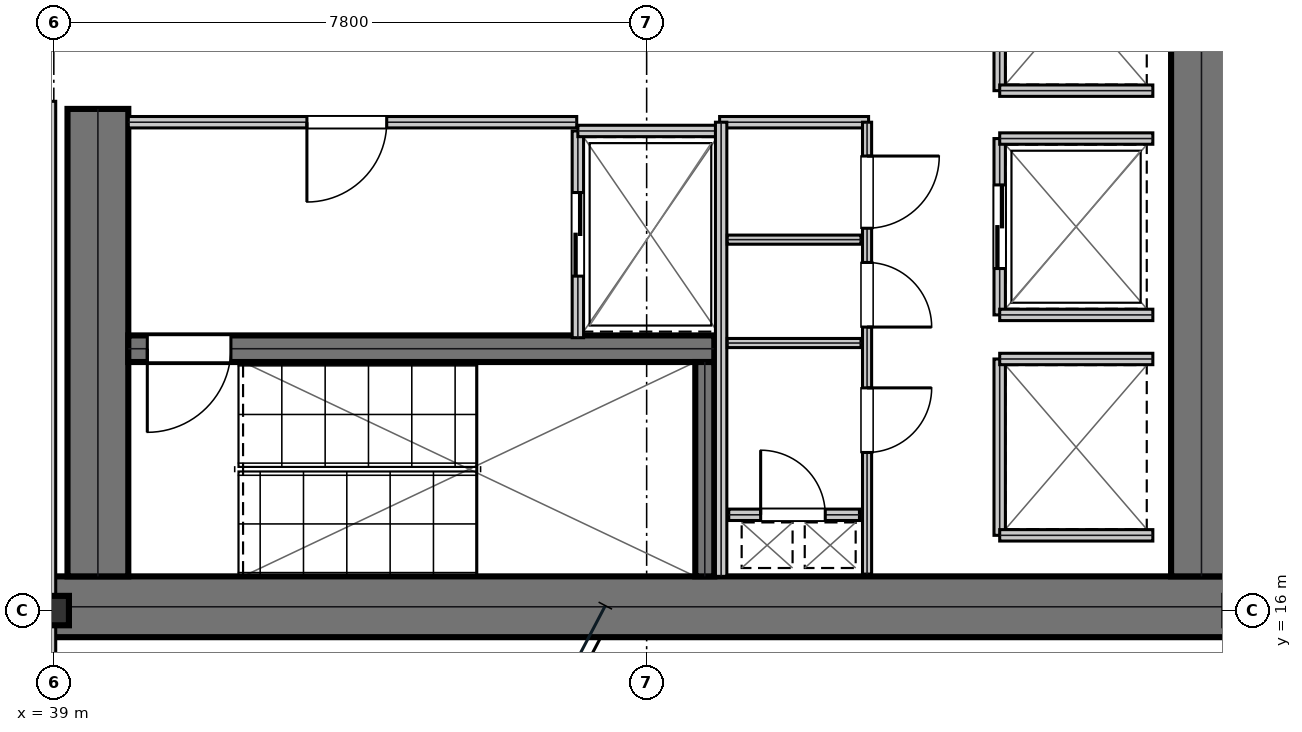
"""IFC4 building model, lengths in metres.
Left out: names, types, materials, properties, quantities, classifications, styles, units other than length and angle.
Written with IfcOpenShell. Run it as: python <this file> out.ifc"""

import sys

from ifc_helpers import new_model, si_unit, direction, frame, frame_2d, origin, origin_2d, place, context, subcontext, project, spatial, rectangle, i_section, extrude, element, fill, save


model = new_model("IFC4")
c1 = context("Model", 3, precision=1e-05, world=origin(), true_north=direction((0.0, 1.0)))
c2 = subcontext(c1, "Body", "Model", "MODEL_VIEW")
j1 = project(units=[si_unit("LENGTHUNIT", "METRE"), si_unit("PLANEANGLEUNIT", "RADIAN")], contexts=[c1])
p1 = place(None, origin())
s1 = spatial("IfcSite", under=j1, at=p1, CompositionType="ELEMENT")
p2 = place(p1, origin())
s2 = spatial("IfcBuilding", under=s1, at=p2, CompositionType="ELEMENT")
p3 = place(p2, frame((0.0, 0.0, 141.15)))
s3 = spatial("IfcBuildingStorey", under=s2, at=p3, CompositionType="ELEMENT", Elevation=141.15)
p4 = place(p3, frame((38.8, 16.05, 0.0), z_axis=(0.0, 0.0, 1.0), x_axis=(1.0, 0.0, 0.0)))
e1 = element("IfcWall", 1, at=p4, inside=s3, PredefinedType="SHEAR", context=c2, shape_type="SweptSolid", body=[
    extrude(rectangle(XDim=16.0, YDim=0.8, at=frame_2d((8.0, 0.0))), origin(), (0.0, 0.0, 1.0), 3.81),
])
p5 = place(p3, frame((39.58, 16.45, 0.0), z_axis=(0.0, 0.0, 1.0), x_axis=(0.0, 1.0, 0.0)))
e2 = element("IfcWall", 2, at=p5, inside=s3, PredefinedType="SHEAR", context=c2, shape_type="SweptSolid", body=[
    extrude(rectangle(XDim=6.15, YDim=0.8, at=frame_2d((3.075, 0.0))), origin(), (0.0, 0.0, 1.0), 3.81),
])
p6 = place(p3, frame((54.1, 16.45, 0.0), z_axis=(0.0, 0.0, 1.0), x_axis=(0.0, 1.0, 0.0)))
e3 = element("IfcWall", 3, at=p6, inside=s3, PredefinedType="SHEAR", context=c2, shape_type="SweptSolid", body=[
    extrude(rectangle(XDim=15.1, YDim=0.8, at=frame_2d((7.55, 0.0))), origin(), (0.0, 0.0, 1.0), 3.81),
])
p7 = place(p3, frame((39.98, 19.445, 0.0), z_axis=(0.0, 0.0, 1.0), x_axis=(1.0, 0.0, 0.0)))
e4 = element("IfcWall", 4, at=p7, inside=s3, PredefinedType="SHEAR", context=c2, shape_type="SweptSolid", body=[
    extrude(rectangle(XDim=7.71, YDim=0.35, at=frame_2d((3.855, 0.0))), origin(), (0.0, 0.0, 1.0), 3.81),
])
p8 = place(p7, frame((0.25, 0.0, 0.0)))
e5 = element("IfcOpeningElement", 5, at=p8, cuts=e4, PredefinedType="OPENING", context=c2, shape_type="SweptSolid", body=[
    extrude(rectangle(XDim=1.1, YDim=2.15, at=frame_2d((0.55, 1.075))), frame((0.0, 0.185, 0.0), z_axis=(0.0, -1.0, 0.0), x_axis=(1.0, 0.0, 0.0)), (0.0, 0.0, 1.0), 0.37),
])
p9 = place(p3, frame((47.565, 16.45, 0.0), z_axis=(0.0, 0.0, 1.0), x_axis=(0.0, 1.0, 0.0)))
e6 = element("IfcWall", 6, at=p9, inside=s3, PredefinedType="SHEAR", context=c2, shape_type="SweptSolid", body=[
    extrude(rectangle(XDim=2.82, YDim=0.25, at=frame_2d((1.41, 0.0))), origin(), (0.0, 0.0, 1.0), 3.81),
])
p10 = place(p3, frame((39.0, 16.0, 0.0), z_axis=(0.0, 0.0, 1.0), x_axis=(1.0, 0.0, 0.0)))
e7 = element("IfcColumn", 7, at=p10, inside=s3, PredefinedType="COLUMN", context=c2, shape_type="SweptSolid", body=[
    extrude(i_section(OverallWidth=0.398, OverallDepth=0.387, WebThickness=0.021, FlangeThickness=0.033, at=origin_2d()), origin(), (0.0, 0.0, 1.0), 4.044),
])
p11 = place(p3, frame((39.98, 22.425, 0.0), z_axis=(0.0, 0.0, 1.0), x_axis=(1.0, 0.0, 0.0)))
e8 = element("IfcWall", 8, at=p11, inside=s3, PredefinedType="PARTITIONING", context=c2, shape_type="SweptSolid", body=[
    extrude(rectangle(XDim=5.9, YDim=0.15, at=frame_2d((2.95, 0.0))), origin(), (0.0, 0.0, 1.0), 3.81),
])
p12 = place(p11, frame((2.35, 0.0, 0.0)))
e9 = element("IfcOpeningElement", 9, at=p12, cuts=e8, PredefinedType="OPENING", context=c2, shape_type="SweptSolid", body=[
    extrude(rectangle(XDim=1.05, YDim=2.15, at=frame_2d((0.525, 1.075))), frame((0.0, 0.085, 0.0), z_axis=(0.0, -1.0, 0.0), x_axis=(1.0, 0.0, 0.0)), (0.0, 0.0, 1.0), 0.17),
])
p13 = place(p3, frame((45.895, 19.59, 0.0), z_axis=(0.0, 0.0, 1.0), x_axis=(0.0, 1.0, 0.0)))
e10 = element("IfcWall", 10, at=p13, inside=s3, PredefinedType="PARTITIONING", context=c2, shape_type="SweptSolid", body=[
    extrude(rectangle(XDim=2.72, YDim=0.15, at=frame_2d((1.36, 0.0))), origin(), (0.0, 0.0, 1.0), 3.81),
])
p14 = place(p13, frame((0.81, 0.0, 0.0)))
e11 = element("IfcOpeningElement", 11, at=p14, cuts=e10, PredefinedType="OPENING", context=c2, shape_type="SweptSolid", body=[
    extrude(rectangle(XDim=1.1, YDim=2.15, at=frame_2d((0.55, 1.075))), frame((0.0, 0.085, 0.0), z_axis=(0.0, -1.0, 0.0), x_axis=(1.0, 0.0, 0.0)), (0.0, 0.0, 1.0), 0.17),
])
p15 = place(p3, frame((45.895, 22.31, 0.0), z_axis=(0.0, 0.0, 1.0), x_axis=(1.0, 0.0, 0.0)))
e12 = element("IfcWall", 12, at=p15, inside=s3, PredefinedType="PARTITIONING", context=c2, shape_type="SweptSolid", body=[
    extrude(rectangle(XDim=1.915, YDim=0.15, at=frame_2d((0.958, 0.0))), origin(), (0.0, 0.0, 1.0), 3.81),
])
p16 = place(p3, frame((51.445, 19.89, 0.0), z_axis=(0.0, 0.0, 1.0), x_axis=(0.0, 1.0, 0.0)))
e13 = element("IfcWall", 13, at=p16, inside=s3, PredefinedType="PARTITIONING", context=c2, shape_type="SweptSolid", body=[
    extrude(rectangle(XDim=2.32, YDim=0.15, at=frame_2d((1.16, 0.0))), origin(), (0.0, 0.0, 1.0), 3.81),
])
p17 = place(p16, frame((0.61, 0.0, 0.0)))
e14 = element("IfcOpeningElement", 14, at=p17, cuts=e13, PredefinedType="OPENING", context=c2, shape_type="SweptSolid", body=[
    extrude(rectangle(XDim=1.1, YDim=2.15, at=frame_2d((0.55, 1.075))), frame((0.0, 0.085, 0.0), z_axis=(0.0, -1.0, 0.0), x_axis=(1.0, 0.0, 0.0)), (0.0, 0.0, 1.0), 0.17),
])
for number, where, z_axis, x_axis in (
    (15, (51.445, 19.89, 0.0), (0.0, 0.0, 1.0), (1.0, 0.0, 0.0)),
    (16, (51.445, 22.21, 0.0), (0.0, 0.0, 1.0), (1.0, 0.0, 0.0)),
):
    element("IfcWall", number, at=place(p3, frame(where, z_axis=z_axis, x_axis=x_axis)), inside=s3, PredefinedType="PARTITIONING", context=c2, shape_type="SweptSolid", body=[
        extrude(rectangle(XDim=2.015, YDim=0.15, at=frame_2d((1.007, 0.0))), origin(), (0.0, 0.0, 1.0), 3.81),
    ])
p18 = place(p3, frame((51.445, 22.84, 0.0), z_axis=(0.0, 0.0, 1.0), x_axis=(0.0, 1.0, 0.0)))
e17 = element("IfcWall", 17, at=p18, inside=s3, PredefinedType="PARTITIONING", context=c2, shape_type="SweptSolid", body=[
    extrude(rectangle(XDim=2.32, YDim=0.15, at=frame_2d((1.16, 0.0))), origin(), (0.0, 0.0, 1.0), 3.81),
])
p19 = place(p3, frame((51.445, 22.84, 0.0), z_axis=(0.0, 0.0, 1.0), x_axis=(1.0, 0.0, 0.0)))
e18 = element("IfcWall", 18, at=p19, inside=s3, PredefinedType="PARTITIONING", context=c2, shape_type="SweptSolid", body=[
    extrude(rectangle(XDim=2.015, YDim=0.15, at=frame_2d((1.007, 0.0))), origin(), (0.0, 0.0, 1.0), 3.81),
])
p20 = place(p3, frame((51.445, 16.99, 0.0), z_axis=(0.0, 0.0, 1.0), x_axis=(0.0, 1.0, 0.0)))
e19 = element("IfcWall", 19, at=p20, inside=s3, PredefinedType="PARTITIONING", context=c2, shape_type="SweptSolid", body=[
    extrude(rectangle(XDim=2.32, YDim=0.15, at=frame_2d((1.16, 0.0))), origin(), (0.0, 0.0, 1.0), 3.81),
])
for number, where, z_axis, x_axis in (
    (20, (51.445, 16.99, 0.0), (0.0, 0.0, 1.0), (1.0, 0.0, 0.0)),
    (21, (51.445, 19.31, 0.0), (0.0, 0.0, 1.0), (1.0, 0.0, 0.0)),
):
    element("IfcWall", number, at=place(p3, frame(where, z_axis=z_axis, x_axis=x_axis)), inside=s3, PredefinedType="PARTITIONING", context=c2, shape_type="SweptSolid", body=[
        extrude(rectangle(XDim=2.015, YDim=0.15, at=frame_2d((1.007, 0.0))), origin(), (0.0, 0.0, 1.0), 3.81),
    ])
p21 = place(p3, frame((47.88, 17.26, 0.0), z_axis=(0.0, 0.0, 1.0), x_axis=(1.0, 0.0, 0.0)))
e22 = element("IfcWall", 22, at=p21, inside=s3, PredefinedType="PARTITIONING", context=c2, shape_type="SweptSolid", body=[
    extrude(rectangle(XDim=1.72, YDim=0.15, at=frame_2d((0.86, 0.0))), origin(), (0.0, 0.0, 1.0), 3.81),
])
p22 = place(p21, frame((0.42, 0.0, 0.0)))
e23 = element("IfcOpeningElement", 23, at=p22, cuts=e22, PredefinedType="OPENING", context=c2, shape_type="SweptSolid", body=[
    extrude(rectangle(XDim=0.85, YDim=2.15, at=frame_2d((0.425, 1.075))), frame((0.0, 0.085, 0.0), z_axis=(0.0, -1.0, 0.0), x_axis=(1.0, 0.0, 0.0)), (0.0, 0.0, 1.0), 0.17),
])
p23 = place(p3, frame((47.76, 22.425, 0.0), z_axis=(0.0, 0.0, 1.0), x_axis=(1.0, 0.0, 0.0)))
e24 = element("IfcWall", 24, at=p23, inside=s3, PredefinedType="PARTITIONING", context=c2, shape_type="SweptSolid", body=[
    extrude(rectangle(XDim=1.96, YDim=0.15, at=frame_2d((0.98, 0.0))), origin(), (0.0, 0.0, 1.0), 3.81),
])
p24 = place(p3, frame((47.78, 16.45, 0.0), z_axis=(0.0, 0.0, 1.0), x_axis=(0.0, 1.0, 0.0)))
e25 = element("IfcWall", 25, at=p24, inside=s3, PredefinedType="PARTITIONING", context=c2, shape_type="SweptSolid", body=[
    extrude(rectangle(XDim=5.975, YDim=0.15, at=frame_2d((2.988, 0.0))), origin(), (0.0, 0.0, 1.0), 3.81),
])
for number, where, z_axis, x_axis in (
    (26, (47.86, 19.52, 0.0), (0.0, 0.0, 1.0), (1.0, 0.0, 0.0)),
    (27, (47.86, 20.88, 0.0), (0.0, 0.0, 1.0), (1.0, 0.0, 0.0)),
):
    element("IfcWall", number, at=place(p3, frame(where, z_axis=z_axis, x_axis=x_axis)), inside=s3, PredefinedType="PARTITIONING", context=c2, shape_type="SweptSolid", body=[
        extrude(rectangle(XDim=1.76, YDim=0.12, at=frame_2d((0.88, 0.0))), origin(), (0.0, 0.0, 1.0), 3.81),
    ])
p25 = place(p3, frame((49.7, 16.48, 0.0), z_axis=(0.0, 0.0, 1.0), x_axis=(0.0, 1.0, 0.0)))
e28 = element("IfcWall", 28, at=p25, inside=s3, PredefinedType="PARTITIONING", context=c2, shape_type="SweptSolid", body=[
    extrude(rectangle(XDim=5.945, YDim=0.12, at=frame_2d((2.973, 0.0))), origin(), (0.0, 0.0, 1.0), 3.81),
])
p26 = place(p25, frame((1.6, 0.0, 0.0)))
e29 = element("IfcOpeningElement", 29, at=p26, cuts=e28, PredefinedType="OPENING", context=c2, shape_type="SweptSolid", body=[
    extrude(rectangle(XDim=0.85, YDim=2.15, at=frame_2d((0.425, 1.075))), frame((0.0, 0.07, 0.0), z_axis=(0.0, -1.0, 0.0), x_axis=(1.0, 0.0, 0.0)), (0.0, 0.0, 1.0), 0.14),
])
p27 = place(p25, frame((3.25, 0.0, 0.0)))
e30 = element("IfcOpeningElement", 30, at=p27, cuts=e28, PredefinedType="OPENING", context=c2, shape_type="SweptSolid", body=[
    extrude(rectangle(XDim=0.85, YDim=2.15, at=frame_2d((0.425, 1.075))), frame((0.0, 0.07, 0.0), z_axis=(0.0, -1.0, 0.0), x_axis=(1.0, 0.0, 0.0)), (0.0, 0.0, 1.0), 0.14),
])
p28 = place(p25, frame((4.55, 0.0, 0.0)))
e31 = element("IfcOpeningElement", 31, at=p28, cuts=e28, PredefinedType="OPENING", context=c2, shape_type="SweptSolid", body=[
    extrude(rectangle(XDim=0.95, YDim=2.15, at=frame_2d((0.475, 1.075))), frame((0.0, 0.07, 0.0), z_axis=(0.0, -1.0, 0.0), x_axis=(1.0, 0.0, 0.0)), (0.0, 0.0, 1.0), 0.14),
])
p29 = place(p3, frame((38.95, 14.5, 0.0), z_axis=(0.0, 0.0, 1.0), x_axis=(0.0, 1.0, 0.0)))
e32 = element("IfcWall", 32, at=p29, inside=s3, PredefinedType="PARTITIONING", context=c2, shape_type="SweptSolid", body=[
    extrude(rectangle(XDim=8.2, YDim=0.15, at=frame_2d((4.1, 0.0))), origin(), (0.0, 0.0, 1.0), 3.19),
])
p30 = place(p12, frame((1.05, 0.0, 0.0), z_axis=(0.0, 0.0, 1.0), x_axis=(-1.0, 0.0, 0.0)))
e33 = element("IfcDoor", 33, at=p30, inside=s3, OperationType="SINGLE_SWING_RIGHT", PredefinedType="DOOR", context=c2, shape_type="SweptSolid", body=[
    extrude(rectangle(XDim=1.05, YDim=2.15, at=frame_2d((0.525, 1.075))), frame((0.0, 0.025, 0.0), z_axis=(0.0, -1.0, 0.0), x_axis=(1.0, 0.0, 0.0)), (0.0, 0.0, 1.0), 0.05),
])
fill(e9, e33)
p31 = place(p14, frame((1.1, 0.0, 0.0), z_axis=(0.0, 0.0, 1.0), x_axis=(-1.0, 0.0, 0.0)))
e34 = element("IfcDoor", 34, at=p31, inside=s3, OperationType="DOUBLE_DOOR_SLIDING", PredefinedType="DOOR", context=c2, shape_type="SweptSolid", body=[
    extrude(rectangle(XDim=1.1, YDim=2.15, at=frame_2d((0.55, 1.075))), frame((0.0, 0.025, 0.0), z_axis=(0.0, -1.0, 0.0), x_axis=(1.0, 0.0, 0.0)), (0.0, 0.0, 1.0), 0.05),
])
fill(e11, e34)
p32 = place(p17, frame((1.1, 0.0, 0.0), z_axis=(0.0, 0.0, 1.0), x_axis=(-1.0, 0.0, 0.0)))
e35 = element("IfcDoor", 35, at=p32, inside=s3, OperationType="DOUBLE_DOOR_SLIDING", PredefinedType="DOOR", context=c2, shape_type="SweptSolid", body=[
    extrude(rectangle(XDim=1.1, YDim=2.15, at=frame_2d((0.55, 1.075))), frame((0.0, 0.025, 0.0), z_axis=(0.0, -1.0, 0.0), x_axis=(1.0, 0.0, 0.0)), (0.0, 0.0, 1.0), 0.05),
])
fill(e14, e35)
p33 = place(p22, origin())
e36 = element("IfcDoor", 36, at=p33, inside=s3, OperationType="SINGLE_SWING_LEFT", PredefinedType="TRAPDOOR", context=c2, shape_type="SweptSolid", body=[
    extrude(rectangle(XDim=0.85, YDim=2.15, at=frame_2d((0.425, 1.075))), frame((0.0, 0.025, 0.0), z_axis=(0.0, -1.0, 0.0), x_axis=(1.0, 0.0, 0.0)), (0.0, 0.0, 1.0), 0.05),
])
fill(e23, e36)
p34 = place(p26, frame((0.85, 0.0, 0.0), z_axis=(0.0, 0.0, 1.0), x_axis=(-1.0, 0.0, 0.0)))
e37 = element("IfcDoor", 37, at=p34, inside=s3, OperationType="SINGLE_SWING_LEFT", PredefinedType="DOOR", context=c2, shape_type="SweptSolid", body=[
    extrude(rectangle(XDim=0.85, YDim=2.15, at=frame_2d((0.425, 1.075))), frame((0.0, 0.025, 0.0), z_axis=(0.0, -1.0, 0.0), x_axis=(1.0, 0.0, 0.0)), (0.0, 0.0, 1.0), 0.05),
])
fill(e29, e37)
p35 = place(p27, frame((0.85, 0.0, 0.0), z_axis=(0.0, 0.0, 1.0), x_axis=(-1.0, 0.0, 0.0)))
e38 = element("IfcDoor", 38, at=p35, inside=s3, OperationType="SINGLE_SWING_RIGHT", PredefinedType="DOOR", context=c2, shape_type="SweptSolid", body=[
    extrude(rectangle(XDim=0.85, YDim=2.15, at=frame_2d((0.425, 1.075))), frame((0.0, 0.025, 0.0), z_axis=(0.0, -1.0, 0.0), x_axis=(1.0, 0.0, 0.0)), (0.0, 0.0, 1.0), 0.05),
])
fill(e30, e38)
p36 = place(p28, frame((0.95, 0.0, 0.0), z_axis=(0.0, 0.0, 1.0), x_axis=(-1.0, 0.0, 0.0)))
e39 = element("IfcDoor", 39, at=p36, inside=s3, OperationType="SINGLE_SWING_LEFT", PredefinedType="DOOR", context=c2, shape_type="SweptSolid", body=[
    extrude(rectangle(XDim=0.95, YDim=2.15, at=frame_2d((0.475, 1.075))), frame((0.0, 0.025, 0.0), z_axis=(0.0, -1.0, 0.0), x_axis=(1.0, 0.0, 0.0)), (0.0, 0.0, 1.0), 0.05),
])
fill(e31, e39)
p37 = place(p8, frame((1.1, 0.0, 0.0), z_axis=(0.0, 0.0, 1.0), x_axis=(-1.0, 0.0, 0.0)))
e40 = element("IfcDoor", 40, at=p37, inside=s3, OperationType="SINGLE_SWING_RIGHT", PredefinedType="DOOR", context=c2, shape_type="SweptSolid", body=[
    extrude(rectangle(XDim=1.1, YDim=2.15, at=frame_2d((0.55, 1.075))), frame((0.0, 0.025, 0.0), z_axis=(0.0, -1.0, 0.0), x_axis=(1.0, 0.0, 0.0)), (0.0, 0.0, 1.0), 0.05),
])
fill(e5, e40)
save(model, sys.argv[1])
